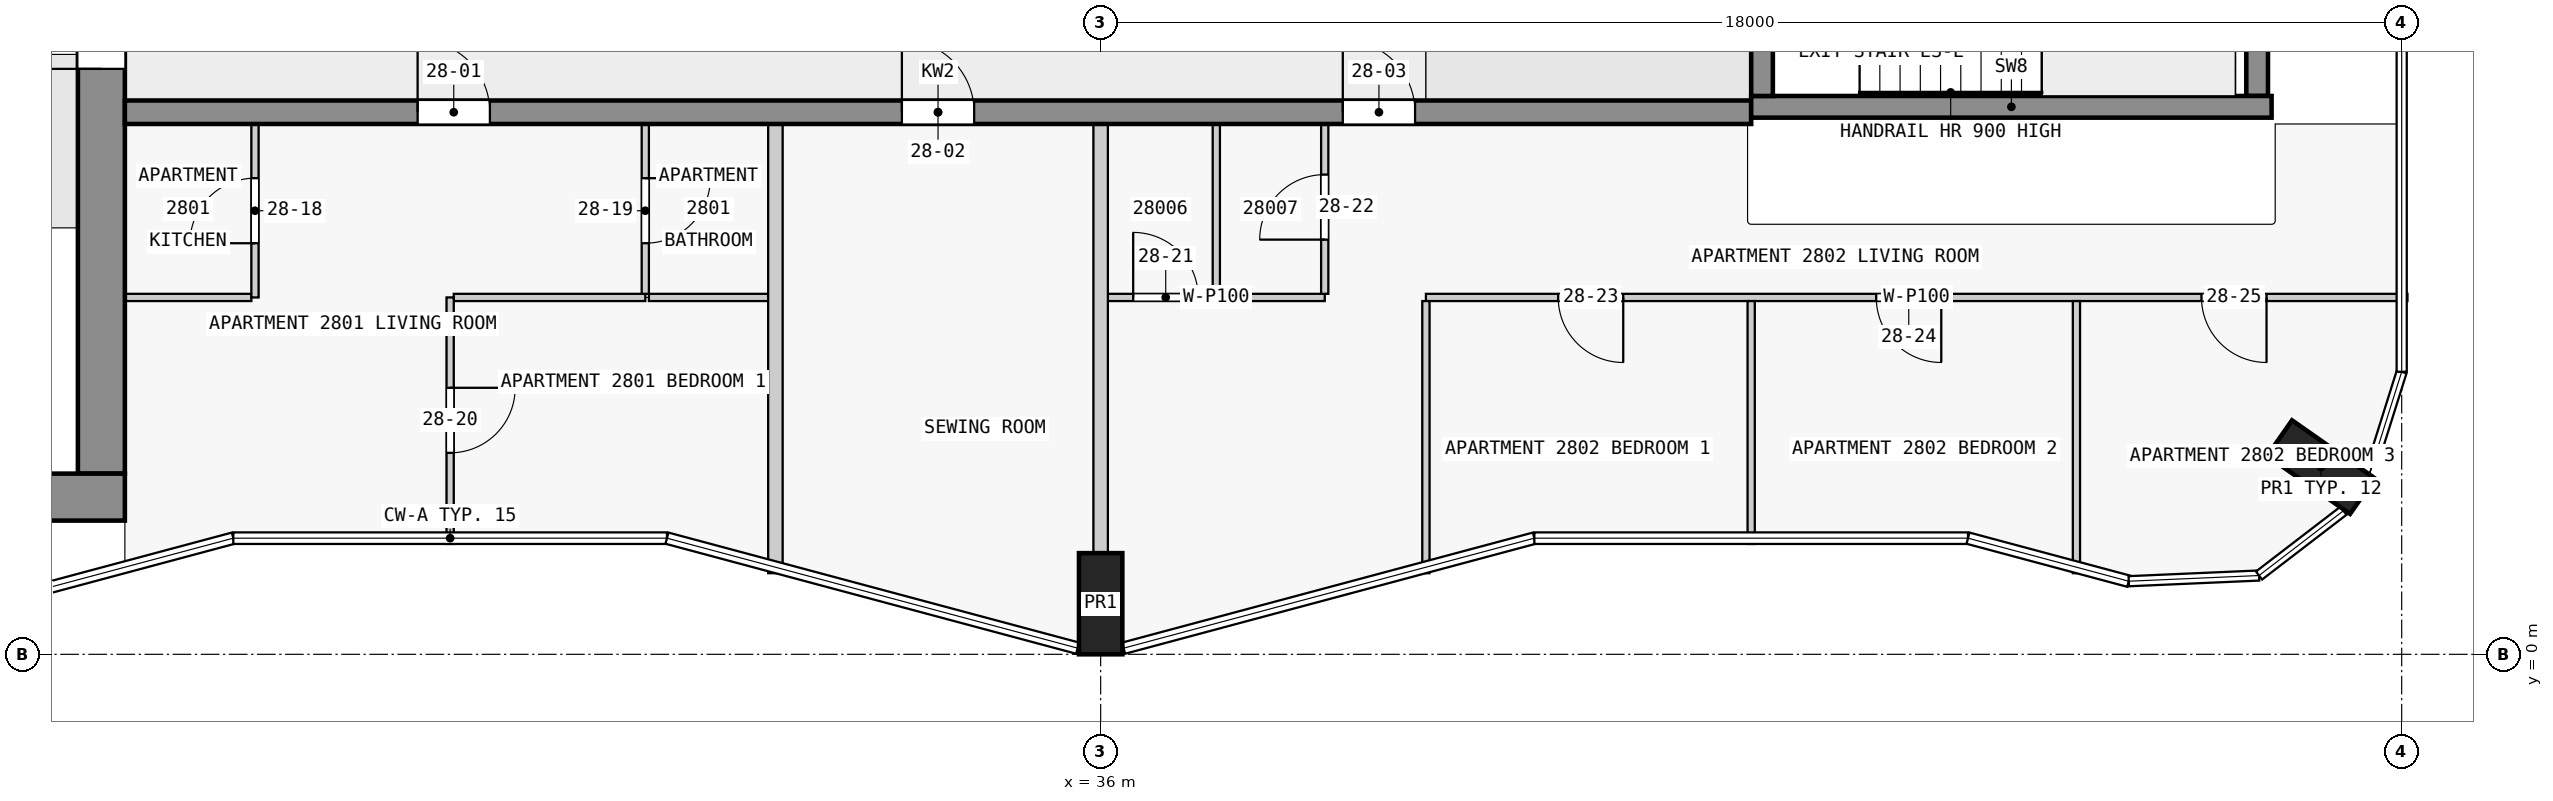
"""IFC4 building model, lengths in metres.
Left out: names, types, materials, properties, quantities, classifications, styles, units other than length and angle.
Written with IfcOpenShell. Run it as: python <this file> out.ifc"""

import sys

from ifc_helpers import new_model, si_unit, direction, frame, frame_2d, origin, origin_2d, place, context, subcontext, project, spatial, rectangle, extrude, element, fill, save


model = new_model("IFC4")
c1 = context("Model", 3, precision=1e-05, world=origin(), true_north=direction((0.0, 1.0)))
c2 = subcontext(c1, "Body", "Model", "MODEL_VIEW")
j1 = project(units=[si_unit("LENGTHUNIT", "METRE"), si_unit("PLANEANGLEUNIT", "RADIAN")], contexts=[c1])
p1 = place(None, origin())
s1 = spatial("IfcSite", under=j1, at=p1, CompositionType="ELEMENT")
p2 = place(p1, origin())
s2 = spatial("IfcBuilding", under=s1, at=p2, CompositionType="ELEMENT")
p3 = place(p2, frame((0.0, 0.0, 109.8)))
s3 = spatial("IfcBuildingStorey", under=s2, at=p3, CompositionType="ELEMENT", Elevation=109.8)
for number, where, z_axis, x_axis in (
    (1, (36.0, 0.7, 0.0), (0.0, 0.0, 1.0), (1.0, 0.0, 0.0)),
    (2, (52.884, 2.59, 0.0), (0.0, 0.0, 1.0), (0.574, 0.819, 0.0)),
):
    element("IfcColumn", number, at=place(p3, frame(where, z_axis=z_axis, x_axis=x_axis)), inside=s3, PredefinedType="COLUMN", context=c2, shape_type="SweptSolid", body=[
        extrude(rectangle(XDim=0.6, YDim=1.4, at=origin_2d()), origin(), (0.0, 0.0, 1.0), 3.5),
    ])
p4 = place(p3, frame((1.65, 2.175, 0.0), z_axis=(0.0, 0.0, 1.0), x_axis=(1.0, 0.0, 0.0)))
e3 = element("IfcWall", 3, at=p4, inside=s3, PredefinedType="SHEAR", context=c2, shape_type="SweptSolid", body=[
    extrude(rectangle(XDim=20.85, YDim=0.65, at=frame_2d((10.425, 0.0))), origin(), (0.0, 0.0, 1.0), 3.25),
])
p5 = place(p3, frame((22.175, 2.5, 0.0), z_axis=(0.0, 0.0, 1.0), x_axis=(0.0, 1.0, 0.0)))
e4 = element("IfcWall", 4, at=p5, inside=s3, PredefinedType="SHEAR", context=c2, shape_type="SweptSolid", body=[
    extrude(rectangle(XDim=14.85, YDim=0.65, at=frame_2d((7.425, 0.0))), origin(), (0.0, 0.0, 1.0), 3.25),
])
p6 = place(p5, frame((5.6, 0.0, 0.0)))
e5 = element("IfcOpeningElement", 5, at=p6, cuts=e4, PredefinedType="OPENING", context=c2, shape_type="SweptSolid", body=[
    extrude(rectangle(XDim=1.8, YDim=2.1, at=frame_2d((0.9, 1.05))), frame((0.0, 0.335, 0.0), z_axis=(0.0, -1.0, 0.0), x_axis=(1.0, 0.0, 0.0)), (0.0, 0.0, 1.0), 0.67),
])
p7 = place(p3, frame((45.15, 7.725, 0.0), z_axis=(0.0, 0.0, 1.0), x_axis=(0.0, 1.0, 0.0)))
e6 = element("IfcWall", 6, at=p7, inside=s3, PredefinedType="SHEAR", context=c2, shape_type="SweptSolid", body=[
    extrude(rectangle(XDim=2.55, YDim=0.3, at=frame_2d((1.275, 0.0))), origin(), (0.0, 0.0, 1.0), 3.5),
])
p8 = place(p7, frame((0.725, 0.0, 0.0)))
e7 = element("IfcOpeningElement", 7, at=p8, cuts=e6, PredefinedType="OPENING", context=c2, shape_type="SweptSolid", body=[
    extrude(rectangle(XDim=1.1, YDim=2.1, at=frame_2d((0.55, 1.05))), frame((0.0, 0.16, 0.0), z_axis=(0.0, -1.0, 0.0), x_axis=(1.0, 0.0, 0.0)), (0.0, 0.0, 1.0), 0.32),
])
p9 = place(p3, frame((52.0, 7.725, 0.0), z_axis=(0.0, 0.0, 1.0), x_axis=(0.0, 1.0, 0.0)))
e8 = element("IfcWall", 8, at=p9, inside=s3, PredefinedType="SHEAR", context=c2, shape_type="SweptSolid", body=[
    extrude(rectangle(XDim=2.55, YDim=0.3, at=frame_2d((1.275, 0.0))), origin(), (0.0, 0.0, 1.0), 3.5),
])
p10 = place(p3, frame((45.0, 7.575, 0.0), z_axis=(0.0, 0.0, 1.0), x_axis=(1.0, 0.0, 0.0)))
e9 = element("IfcWall", 9, at=p10, inside=s3, PredefinedType="SHEAR", context=c2, shape_type="SweptSolid", body=[
    extrude(rectangle(XDim=7.2, YDim=0.3, at=frame_2d((3.6, 0.0))), origin(), (0.0, 0.0, 1.0), 3.5),
])
p11 = place(p3, frame((22.5, 7.5, 0.0), z_axis=(0.0, 0.0, 1.0), x_axis=(1.0, 0.0, 0.0)))
e10 = element("IfcWall", 10, at=p11, inside=s3, PredefinedType="SHEAR", context=c2, shape_type="SweptSolid", body=[
    extrude(rectangle(XDim=22.5, YDim=0.325, at=frame_2d((11.25, 0.0))), origin(), (0.0, 0.0, 1.0), 3.25),
])
p12 = place(p11, frame((4.05, 0.0, 0.0)))
e11 = element("IfcOpeningElement", 11, at=p12, cuts=e10, PredefinedType="OPENING", context=c2, shape_type="SweptSolid", body=[
    extrude(rectangle(XDim=1.0, YDim=2.1, at=frame_2d((0.5, 1.05))), frame((0.0, 0.172, 0.0), z_axis=(0.0, -1.0, 0.0), x_axis=(1.0, 0.0, 0.0)), (0.0, 0.0, 1.0), 0.345),
])
p13 = place(p11, frame((10.75, 0.0, 0.0)))
e12 = element("IfcOpeningElement", 12, at=p13, cuts=e10, PredefinedType="OPENING", context=c2, shape_type="SweptSolid", body=[
    extrude(rectangle(XDim=1.0, YDim=2.1, at=frame_2d((0.5, 1.05))), frame((0.0, 0.172, 0.0), z_axis=(0.0, -1.0, 0.0), x_axis=(1.0, 0.0, 0.0)), (0.0, 0.0, 1.0), 0.345),
])
p14 = place(p11, frame((16.85, 0.0, 0.0)))
e13 = element("IfcOpeningElement", 13, at=p14, cuts=e10, PredefinedType="OPENING", context=c2, shape_type="SweptSolid", body=[
    extrude(rectangle(XDim=1.0, YDim=2.1, at=frame_2d((0.5, 1.05))), frame((0.0, 0.172, 0.0), z_axis=(0.0, -1.0, 0.0), x_axis=(1.0, 0.0, 0.0)), (0.0, 0.0, 1.0), 0.345),
])
p15 = place(p3, frame((29.7, 4.938, 0.0), z_axis=(0.0, 0.0, 1.0), x_axis=(-1.0, 0.0, 0.0)))
e14 = element("IfcWall", 14, at=p15, inside=s3, PredefinedType="PARTITIONING", context=c2, shape_type="SweptSolid", body=[
    extrude(rectangle(XDim=2.65, YDim=0.1, at=frame_2d((1.325, 0.0))), origin(), (0.0, 0.0, 1.0), 3.25),
])
p16 = place(p3, frame((54.08, 4.938, 0.0), z_axis=(0.0, 0.0, 1.0), x_axis=(-1.0, 0.0, 0.0)))
e15 = element("IfcWall", 15, at=p16, inside=s3, PredefinedType="PARTITIONING", context=c2, shape_type="SweptSolid", body=[
    extrude(rectangle(XDim=13.58, YDim=0.1, at=frame_2d((6.79, 0.0))), origin(), (0.0, 0.0, 1.0), 3.25),
])
p17 = place(p16, frame((10.85, 0.0, 0.0)))
e16 = element("IfcOpeningElement", 16, at=p17, cuts=e15, PredefinedType="OPENING", context=c2, shape_type="SweptSolid", body=[
    extrude(rectangle(XDim=0.9, YDim=2.1, at=frame_2d((0.45, 1.05))), frame((0.0, 0.06, 0.0), z_axis=(0.0, -1.0, 0.0), x_axis=(1.0, 0.0, 0.0)), (0.0, 0.0, 1.0), 0.12),
])
p18 = place(p16, frame((6.45, 0.0, 0.0)))
e17 = element("IfcOpeningElement", 17, at=p18, cuts=e15, PredefinedType="OPENING", context=c2, shape_type="SweptSolid", body=[
    extrude(rectangle(XDim=0.9, YDim=2.1, at=frame_2d((0.45, 1.05))), frame((0.0, 0.06, 0.0), z_axis=(0.0, -1.0, 0.0), x_axis=(1.0, 0.0, 0.0)), (0.0, 0.0, 1.0), 0.12),
])
p19 = place(p16, frame((1.95, 0.0, 0.0)))
e18 = element("IfcOpeningElement", 18, at=p19, cuts=e15, PredefinedType="OPENING", context=c2, shape_type="SweptSolid", body=[
    extrude(rectangle(XDim=0.9, YDim=2.1, at=frame_2d((0.45, 1.05))), frame((0.0, 0.06, 0.0), z_axis=(0.0, -1.0, 0.0), x_axis=(1.0, 0.0, 0.0)), (0.0, 0.0, 1.0), 0.12),
])
p20 = place(p3, frame((22.5, 4.938, 0.0), z_axis=(0.0, 0.0, 1.0), x_axis=(1.0, 0.0, 0.0)))
e19 = element("IfcWall", 19, at=p20, inside=s3, PredefinedType="PARTITIONING", context=c2, shape_type="SweptSolid", body=[
    extrude(rectangle(XDim=1.75, YDim=0.1, at=frame_2d((0.875, 0.0))), origin(), (0.0, 0.0, 1.0), 3.25),
])
p21 = place(p3, frame((29.75, 4.938, 0.0), z_axis=(0.0, 0.0, 1.0), x_axis=(1.0, 0.0, 0.0)))
e20 = element("IfcWall", 20, at=p21, inside=s3, PredefinedType="PARTITIONING", context=c2, shape_type="SweptSolid", body=[
    extrude(rectangle(XDim=1.65, YDim=0.1, at=frame_2d((0.825, 0.0))), origin(), (0.0, 0.0, 1.0), 3.25),
])
p22 = place(p3, frame((36.1, 4.938, 0.0), z_axis=(0.0, 0.0, 1.0), x_axis=(1.0, 0.0, 0.0)))
e21 = element("IfcWall", 21, at=p22, inside=s3, PredefinedType="PARTITIONING", context=c2, shape_type="SweptSolid", body=[
    extrude(rectangle(XDim=3.0, YDim=0.1, at=frame_2d((1.5, 0.0))), origin(), (0.0, 0.0, 1.0), 3.25),
])
p23 = place(p22, frame((0.35, 0.0, 0.0)))
e22 = element("IfcOpeningElement", 22, at=p23, cuts=e21, PredefinedType="OPENING", context=c2, shape_type="SweptSolid", body=[
    extrude(rectangle(XDim=0.9, YDim=2.1, at=frame_2d((0.45, 1.05))), frame((0.0, 0.06, 0.0), z_axis=(0.0, -1.0, 0.0), x_axis=(1.0, 0.0, 0.0)), (0.0, 0.0, 1.0), 0.12),
])
p24 = place(p3, frame((24.3, 4.938, 0.0), z_axis=(0.0, 0.0, 1.0), x_axis=(0.0, 1.0, 0.0)))
e23 = element("IfcWall", 23, at=p24, inside=s3, PredefinedType="PARTITIONING", context=c2, shape_type="SweptSolid", body=[
    extrude(rectangle(XDim=2.4, YDim=0.1, at=frame_2d((1.2, 0.0))), origin(), (0.0, 0.0, 1.0), 3.25),
])
p25 = place(p24, frame((0.75, 0.0, 0.0)))
e24 = element("IfcOpeningElement", 24, at=p25, cuts=e23, PredefinedType="OPENING", context=c2, shape_type="SweptSolid", body=[
    extrude(rectangle(XDim=0.9, YDim=2.1, at=frame_2d((0.45, 1.05))), frame((0.0, 0.06, 0.0), z_axis=(0.0, -1.0, 0.0), x_axis=(1.0, 0.0, 0.0)), (0.0, 0.0, 1.0), 0.12),
])
p26 = place(p3, frame((27.0, 4.938, 0.0), z_axis=(0.0, 0.0, 1.0), x_axis=(0.0, -1.0, 0.0)))
e25 = element("IfcWall", 25, at=p26, inside=s3, PredefinedType="PARTITIONING", context=c2, shape_type="SweptSolid", body=[
    extrude(rectangle(XDim=3.411, YDim=0.1, at=frame_2d((1.705, 0.0))), origin(), (0.0, 0.0, 1.0), 3.25),
])
p27 = place(p26, frame((1.25, 0.0, 0.0)))
e26 = element("IfcOpeningElement", 26, at=p27, cuts=e25, PredefinedType="OPENING", context=c2, shape_type="SweptSolid", body=[
    extrude(rectangle(XDim=0.9, YDim=2.1, at=frame_2d((0.45, 1.05))), frame((0.0, 0.06, 0.0), z_axis=(0.0, -1.0, 0.0), x_axis=(1.0, 0.0, 0.0)), (0.0, 0.0, 1.0), 0.12),
])
p28 = place(p3, frame((29.7, 7.337, 0.0), z_axis=(0.0, 0.0, 1.0), x_axis=(0.0, -1.0, 0.0)))
e27 = element("IfcWall", 27, at=p28, inside=s3, PredefinedType="PARTITIONING", context=c2, shape_type="SweptSolid", body=[
    extrude(rectangle(XDim=2.35, YDim=0.1, at=frame_2d((1.175, 0.0))), origin(), (0.0, 0.0, 1.0), 3.25),
])
p29 = place(p28, frame((0.75, 0.0, 0.0)))
e28 = element("IfcOpeningElement", 28, at=p29, cuts=e27, PredefinedType="OPENING", context=c2, shape_type="SweptSolid", body=[
    extrude(rectangle(XDim=0.9, YDim=2.1, at=frame_2d((0.45, 1.05))), frame((0.0, 0.06, 0.0), z_axis=(0.0, -1.0, 0.0), x_axis=(1.0, 0.0, 0.0)), (0.0, 0.0, 1.0), 0.12),
])
p30 = place(p3, frame((31.5, 1.122, 0.0), z_axis=(0.0, 0.0, 1.0), x_axis=(0.0, 1.0, 0.0)))
e29 = element("IfcWall", 29, at=p30, inside=s3, PredefinedType="PARTITIONING", context=c2, shape_type="SweptSolid", body=[
    extrude(rectangle(XDim=6.215, YDim=0.2, at=frame_2d((3.107, 0.0))), origin(), (0.0, 0.0, 1.0), 3.25),
])
p31 = place(p3, frame((36.0, 1.4, 0.0), z_axis=(0.0, 0.0, 1.0), x_axis=(0.0, 1.0, 0.0)))
e30 = element("IfcWall", 30, at=p31, inside=s3, PredefinedType="PARTITIONING", context=c2, shape_type="SweptSolid", body=[
    extrude(rectangle(XDim=5.938, YDim=0.2, at=frame_2d((2.969, 0.0))), origin(), (0.0, 0.0, 1.0), 3.25),
])
p32 = place(p3, frame((37.6, 4.988, 0.0), z_axis=(0.0, 0.0, 1.0), x_axis=(0.0, 1.0, 0.0)))
e31 = element("IfcWall", 31, at=p32, inside=s3, PredefinedType="PARTITIONING", context=c2, shape_type="SweptSolid", body=[
    extrude(rectangle(XDim=2.35, YDim=0.1, at=frame_2d((1.175, 0.0))), origin(), (0.0, 0.0, 1.0), 3.25),
])
p33 = place(p3, frame((39.1, 4.988, 0.0), z_axis=(0.0, 0.0, 1.0), x_axis=(0.0, 1.0, 0.0)))
e32 = element("IfcWall", 32, at=p33, inside=s3, PredefinedType="PARTITIONING", context=c2, shape_type="SweptSolid", body=[
    extrude(rectangle(XDim=2.35, YDim=0.1, at=frame_2d((1.175, 0.0))), origin(), (0.0, 0.0, 1.0), 3.25),
])
p34 = place(p33, frame((0.75, 0.0, 0.0)))
e33 = element("IfcOpeningElement", 33, at=p34, cuts=e32, PredefinedType="OPENING", context=c2, shape_type="SweptSolid", body=[
    extrude(rectangle(XDim=0.9, YDim=2.1, at=frame_2d((0.45, 1.05))), frame((0.0, 0.06, 0.0), z_axis=(0.0, -1.0, 0.0), x_axis=(1.0, 0.0, 0.0)), (0.0, 0.0, 1.0), 0.12),
])
p35 = place(p3, frame((40.5, 4.887, 0.0), z_axis=(0.0, 0.0, 1.0), x_axis=(0.0, -1.0, 0.0)))
e34 = element("IfcWall", 34, at=p35, inside=s3, PredefinedType="PARTITIONING", context=c2, shape_type="SweptSolid", body=[
    extrude(rectangle(XDim=3.765, YDim=0.1, at=frame_2d((1.883, 0.0))), origin(), (0.0, 0.0, 1.0), 3.25),
])
p36 = place(p3, frame((45.0, 1.527, 0.0), z_axis=(0.0, 0.0, 1.0), x_axis=(0.0, 1.0, 0.0)))
e35 = element("IfcWall", 35, at=p36, inside=s3, PredefinedType="PARTITIONING", context=c2, shape_type="SweptSolid", body=[
    extrude(rectangle(XDim=3.361, YDim=0.1, at=frame_2d((1.68, 0.0))), origin(), (0.0, 0.0, 1.0), 3.25),
])
p37 = place(p3, frame((49.5, 1.122, 0.0), z_axis=(0.0, 0.0, 1.0), x_axis=(0.0, 1.0, 0.0)))
e36 = element("IfcWall", 36, at=p37, inside=s3, PredefinedType="PARTITIONING", context=c2, shape_type="SweptSolid", body=[
    extrude(rectangle(XDim=3.765, YDim=0.1, at=frame_2d((1.883, 0.0))), origin(), (0.0, 0.0, 1.0), 3.25),
])
p38 = place(p6, origin())
e37 = element("IfcDoor", 37, at=p38, inside=s3, OperationType="DOUBLE_DOOR_SINGLE_SWING", PredefinedType="DOOR", context=c2, shape_type="SweptSolid", body=[
    extrude(rectangle(XDim=1.8, YDim=2.1, at=frame_2d((0.9, 1.05))), frame((0.0, 0.025, 0.0), z_axis=(0.0, -1.0, 0.0), x_axis=(1.0, 0.0, 0.0)), (0.0, 0.0, 1.0), 0.05),
])
fill(e5, e37)
p39 = place(p12, origin())
e38 = element("IfcDoor", 38, at=p39, inside=s3, OperationType="SINGLE_SWING_LEFT", PredefinedType="DOOR", context=c2, shape_type="SweptSolid", body=[
    extrude(rectangle(XDim=1.0, YDim=2.1, at=frame_2d((0.5, 1.05))), frame((0.0, 0.025, 0.0), z_axis=(0.0, -1.0, 0.0), x_axis=(1.0, 0.0, 0.0)), (0.0, 0.0, 1.0), 0.05),
])
fill(e11, e38)
p40 = place(p13, origin())
e39 = element("IfcDoor", 39, at=p40, inside=s3, OperationType="SINGLE_SWING_LEFT", PredefinedType="DOOR", context=c2, shape_type="SweptSolid", body=[
    extrude(rectangle(XDim=1.0, YDim=2.1, at=frame_2d((0.5, 1.05))), frame((0.0, 0.025, 0.0), z_axis=(0.0, -1.0, 0.0), x_axis=(1.0, 0.0, 0.0)), (0.0, 0.0, 1.0), 0.05),
])
fill(e12, e39)
p41 = place(p14, origin())
e40 = element("IfcDoor", 40, at=p41, inside=s3, OperationType="SINGLE_SWING_RIGHT", PredefinedType="DOOR", context=c2, shape_type="SweptSolid", body=[
    extrude(rectangle(XDim=1.0, YDim=2.1, at=frame_2d((0.5, 1.05))), frame((0.0, 0.025, 0.0), z_axis=(0.0, -1.0, 0.0), x_axis=(1.0, 0.0, 0.0)), (0.0, 0.0, 1.0), 0.05),
])
fill(e13, e40)
p42 = place(p25, origin())
e41 = element("IfcDoor", 41, at=p42, inside=s3, OperationType="SINGLE_SWING_LEFT", PredefinedType="DOOR", context=c2, shape_type="SweptSolid", body=[
    extrude(rectangle(XDim=0.9, YDim=2.1, at=frame_2d((0.45, 1.05))), frame((0.0, 0.025, 0.0), z_axis=(0.0, -1.0, 0.0), x_axis=(1.0, 0.0, 0.0)), (0.0, 0.0, 1.0), 0.05),
])
fill(e24, e41)
p43 = place(p29, origin())
e42 = element("IfcDoor", 42, at=p43, inside=s3, OperationType="SINGLE_SWING_RIGHT", PredefinedType="DOOR", context=c2, shape_type="SweptSolid", body=[
    extrude(rectangle(XDim=0.9, YDim=2.1, at=frame_2d((0.45, 1.05))), frame((0.0, 0.025, 0.0), z_axis=(0.0, -1.0, 0.0), x_axis=(1.0, 0.0, 0.0)), (0.0, 0.0, 1.0), 0.05),
])
fill(e28, e42)
p44 = place(p27, origin())
e43 = element("IfcDoor", 43, at=p44, inside=s3, OperationType="SINGLE_SWING_LEFT", PredefinedType="DOOR", context=c2, shape_type="SweptSolid", body=[
    extrude(rectangle(XDim=0.9, YDim=2.1, at=frame_2d((0.45, 1.05))), frame((0.0, 0.025, 0.0), z_axis=(0.0, -1.0, 0.0), x_axis=(1.0, 0.0, 0.0)), (0.0, 0.0, 1.0), 0.05),
])
fill(e26, e43)
p45 = place(p23, origin())
e44 = element("IfcDoor", 44, at=p45, inside=s3, OperationType="SINGLE_SWING_LEFT", PredefinedType="DOOR", context=c2, shape_type="SweptSolid", body=[
    extrude(rectangle(XDim=0.9, YDim=2.1, at=frame_2d((0.45, 1.05))), frame((0.0, 0.025, 0.0), z_axis=(0.0, -1.0, 0.0), x_axis=(1.0, 0.0, 0.0)), (0.0, 0.0, 1.0), 0.05),
])
fill(e22, e44)
p46 = place(p34, origin())
e45 = element("IfcDoor", 45, at=p46, inside=s3, OperationType="SINGLE_SWING_RIGHT", PredefinedType="DOOR", context=c2, shape_type="SweptSolid", body=[
    extrude(rectangle(XDim=0.9, YDim=2.1, at=frame_2d((0.45, 1.05))), frame((0.0, 0.025, 0.0), z_axis=(0.0, -1.0, 0.0), x_axis=(1.0, 0.0, 0.0)), (0.0, 0.0, 1.0), 0.05),
])
fill(e33, e45)
p47 = place(p17, origin())
e46 = element("IfcDoor", 46, at=p47, inside=s3, OperationType="SINGLE_SWING_RIGHT", PredefinedType="DOOR", context=c2, shape_type="SweptSolid", body=[
    extrude(rectangle(XDim=0.9, YDim=2.1, at=frame_2d((0.45, 1.05))), frame((0.0, 0.025, 0.0), z_axis=(0.0, -1.0, 0.0), x_axis=(1.0, 0.0, 0.0)), (0.0, 0.0, 1.0), 0.05),
])
fill(e16, e46)
p48 = place(p18, origin())
e47 = element("IfcDoor", 47, at=p48, inside=s3, OperationType="SINGLE_SWING_RIGHT", PredefinedType="DOOR", context=c2, shape_type="SweptSolid", body=[
    extrude(rectangle(XDim=0.9, YDim=2.1, at=frame_2d((0.45, 1.05))), frame((0.0, 0.025, 0.0), z_axis=(0.0, -1.0, 0.0), x_axis=(1.0, 0.0, 0.0)), (0.0, 0.0, 1.0), 0.05),
])
fill(e17, e47)
p49 = place(p19, origin())
e48 = element("IfcDoor", 48, at=p49, inside=s3, OperationType="SINGLE_SWING_LEFT", PredefinedType="DOOR", context=c2, shape_type="SweptSolid", body=[
    extrude(rectangle(XDim=0.9, YDim=2.1, at=frame_2d((0.45, 1.05))), frame((0.0, 0.025, 0.0), z_axis=(0.0, -1.0, 0.0), x_axis=(1.0, 0.0, 0.0)), (0.0, 0.0, 1.0), 0.05),
])
fill(e18, e48)
save(model, sys.argv[1])
